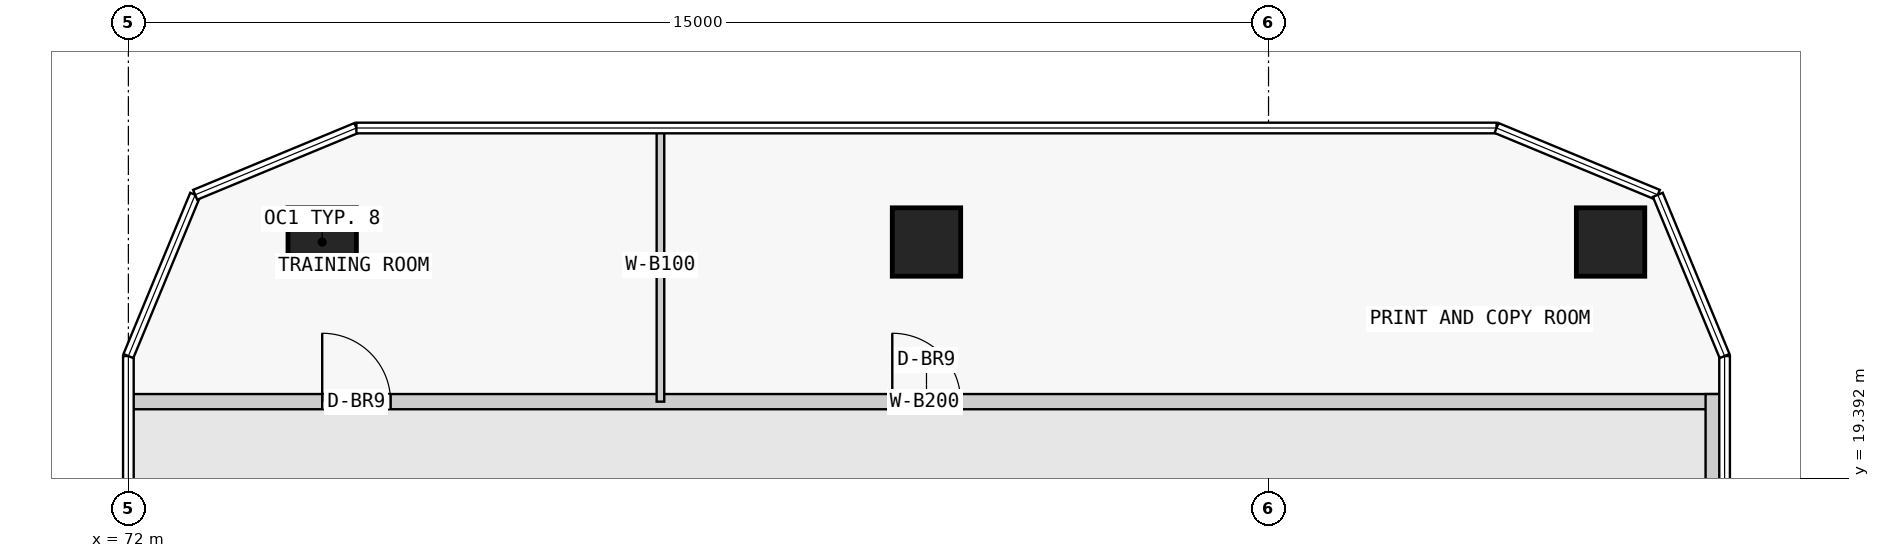
"""IFC4 building model, lengths in metres.
Left out: names, types, materials, properties, quantities, classifications, styles, units other than length and angle.
Written with IfcOpenShell. Run it as: python <this file> out.ifc"""

import sys

from ifc_helpers import new_model, si_unit, direction, frame, frame_2d, origin, origin_2d, place, context, subcontext, project, spatial, rectangle, extrude, element, fill, save


model = new_model("IFC4")
c1 = context("Model", 3, precision=1e-05, world=origin(), true_north=direction((0.0, 1.0)))
c2 = subcontext(c1, "Body", "Model", "MODEL_VIEW")
j1 = project(units=[si_unit("LENGTHUNIT", "METRE"), si_unit("PLANEANGLEUNIT", "RADIAN")], contexts=[c1])
p1 = place(None, origin())
s1 = spatial("IfcSite", under=j1, at=p1, CompositionType="ELEMENT")
p2 = place(p1, origin())
s2 = spatial("IfcBuilding", under=s1, at=p2, CompositionType="ELEMENT")
p3 = place(p2, frame((0.0, 0.0, 120.3)))
s3 = spatial("IfcBuildingStorey", under=s2, at=p3, CompositionType="ELEMENT", Elevation=120.3)
for number, where, z_axis, x_axis in (
    (1, (91.5, 22.5, 0.0), (0.0, 0.0, 1.0), (1.0, 0.0, 0.0)),
    (2, (82.5, 22.5, 0.0), (0.0, 0.0, 1.0), (1.0, 0.0, 0.0)),
    (3, (74.55, 22.5, 0.0), (0.0, 0.0, 1.0), (1.0, 0.0, 0.0)),
):
    element("IfcColumn", number, at=place(p3, frame(where, z_axis=z_axis, x_axis=x_axis)), inside=s3, PredefinedType="COLUMN", context=c2, shape_type="SweptSolid", body=[
        extrude(rectangle(XDim=0.9, YDim=0.9, at=origin_2d()), origin(), (0.0, 0.0, 1.0), 3.5),
    ])
p4 = place(p3, frame((72.0, 20.4, 0.0), z_axis=(0.0, 0.0, 1.0), x_axis=(1.0, 0.0, 0.0)))
e4 = element("IfcWall", 4, at=p4, inside=s3, PredefinedType="PARTITIONING", context=c2, shape_type="SweptSolid", body=[
    extrude(rectangle(XDim=20.95, YDim=0.2, at=frame_2d((10.475, 0.0))), origin(), (0.0, 0.0, 1.0), 3.2),
])
p5 = place(p4, frame((2.55, 0.0, 0.0)))
e5 = element("IfcOpeningElement", 5, at=p5, cuts=e4, PredefinedType="OPENING", context=c2, shape_type="SweptSolid", body=[
    extrude(rectangle(XDim=0.9, YDim=2.1, at=frame_2d((0.45, 1.05))), frame((0.0, 0.11, 0.0), z_axis=(0.0, -1.0, 0.0), x_axis=(1.0, 0.0, 0.0)), (0.0, 0.0, 1.0), 0.22),
])
p6 = place(p4, frame((10.05, 0.0, 0.0)))
e6 = element("IfcOpeningElement", 6, at=p6, cuts=e4, PredefinedType="OPENING", context=c2, shape_type="SweptSolid", body=[
    extrude(rectangle(XDim=0.9, YDim=2.1, at=frame_2d((0.45, 1.05))), frame((0.0, 0.11, 0.0), z_axis=(0.0, -1.0, 0.0), x_axis=(1.0, 0.0, 0.0)), (0.0, 0.0, 1.0), 0.22),
])
p7 = place(p3, frame((92.85, -2.5, 0.0), z_axis=(0.0, 0.0, 1.0), x_axis=(0.0, 1.0, 0.0)))
e7 = element("IfcWall", 7, at=p7, inside=s3, PredefinedType="PARTITIONING", context=c2, shape_type="SweptSolid", body=[
    extrude(rectangle(XDim=23.0, YDim=0.2, at=frame_2d((11.5, 0.0))), origin(), (0.0, 0.0, 1.0), 3.2),
])
p8 = place(p3, frame((79.0, 20.4, 0.0), z_axis=(0.0, 0.0, 1.0), x_axis=(0.0, 1.0, 0.0)))
e8 = element("IfcWall", 8, at=p8, inside=s3, PredefinedType="PARTITIONING", context=c2, shape_type="SweptSolid", body=[
    extrude(rectangle(XDim=3.6, YDim=0.1, at=frame_2d((1.8, 0.0))), origin(), (0.0, 0.0, 1.0), 3.2),
])
p9 = place(p5, origin())
e9 = element("IfcDoor", 9, at=p9, inside=s3, OperationType="SINGLE_SWING_LEFT", PredefinedType="DOOR", context=c2, shape_type="SweptSolid", body=[
    extrude(rectangle(XDim=0.9, YDim=2.1, at=frame_2d((0.45, 1.05))), frame((0.0, 0.025, 0.0), z_axis=(0.0, -1.0, 0.0), x_axis=(1.0, 0.0, 0.0)), (0.0, 0.0, 1.0), 0.05),
])
fill(e5, e9)
p10 = place(p6, origin())
e10 = element("IfcDoor", 10, at=p10, inside=s3, OperationType="SINGLE_SWING_LEFT", PredefinedType="DOOR", context=c2, shape_type="SweptSolid", body=[
    extrude(rectangle(XDim=0.9, YDim=2.1, at=frame_2d((0.45, 1.05))), frame((0.0, 0.025, 0.0), z_axis=(0.0, -1.0, 0.0), x_axis=(1.0, 0.0, 0.0)), (0.0, 0.0, 1.0), 0.05),
])
fill(e6, e10)
save(model, sys.argv[1])
